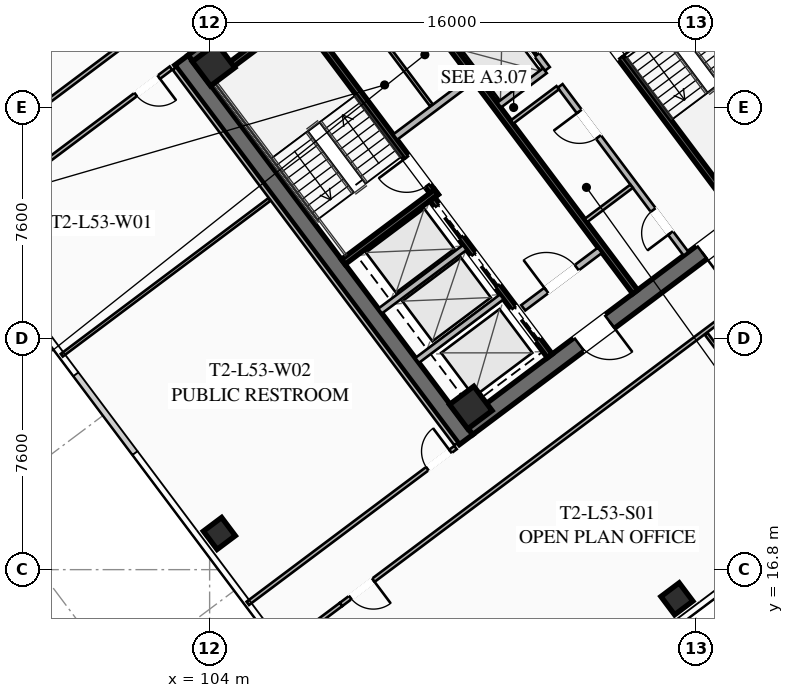
"""IFC4 building model, lengths in metres.
Left out: names, types, materials, properties, quantities, classifications, styles, units other than length and angle.
Written with IfcOpenShell. Run it as: python <this file> out.ifc"""

import sys

from ifc_helpers import new_model, si_unit, direction, frame, frame_2d, origin, origin_2d, place, context, subcontext, project, spatial, rectangle, hollow_rectangle, extrude, element, fill, save


model = new_model("IFC4")
c1 = context("Model", 3, precision=1e-05, world=origin(), true_north=direction((0.0, 1.0)))
c2 = subcontext(c1, "Body", "Model", "MODEL_VIEW")
j1 = project(units=[si_unit("LENGTHUNIT", "METRE"), si_unit("PLANEANGLEUNIT", "RADIAN")], contexts=[c1])
p1 = place(None, origin())
s1 = spatial("IfcSite", under=j1, at=p1, CompositionType="ELEMENT")
p2 = place(p1, origin())
s2 = spatial("IfcBuilding", under=s1, at=p2, CompositionType="ELEMENT")
p3 = place(p2, frame((0.0, 0.0, 196.05)))
s3 = spatial("IfcBuildingStorey", under=s2, at=p3, CompositionType="ELEMENT", Elevation=196.05)
for number, where, z_axis, x_axis in (
    (1, (112.436, 21.077, 0.0), (0.0, 0.0, 1.0), (-0.6, 0.8, 0.0)),
    (2, (115.564, 42.923, 0.0), (0.0, 0.0, 1.0), (0.6, -0.8, 0.0)),
):
    element("IfcWall", number, at=place(p3, frame(where, z_axis=z_axis, x_axis=x_axis)), inside=s3, PredefinedType="SHEAR", context=c2, shape_type="SweptSolid", body=[
        extrude(rectangle(XDim=15.6, YDim=0.55, at=frame_2d((7.8, 0.0))), origin(), (0.0, 0.0, 1.0), 3.55),
    ])
p4 = place(p3, frame((124.539, 30.498, 0.0), z_axis=(0.0, 0.0, 1.0), x_axis=(-0.799998054672, -0.600002593761, 0.0)))
e3 = element("IfcWall", 3, at=p4, inside=s3, PredefinedType="SHEAR", context=c2, shape_type="SweptSolid", body=[
    extrude(rectangle(XDim=15.06, YDim=0.55, at=frame_2d((7.53, 0.0))), origin(), (0.0, 0.0, 1.0), 3.55),
])
p5 = place(p4, frame((9.23, 0.0, 0.0)))
e4 = element("IfcOpeningElement", 4, at=p5, cuts=e3, PredefinedType="OPENING", context=c2, shape_type="SweptSolid", body=[
    extrude(rectangle(XDim=1.25, YDim=2.25, at=frame_2d((0.625, 1.125))), frame((0.0, 0.285, 0.0), z_axis=(0.0, -1.0, 0.0), x_axis=(1.0, 0.0, 0.0)), (0.0, 0.0, 1.0), 0.57),
])
p6 = place(p4, frame((4.18, 0.0, 0.0)))
e5 = element("IfcOpeningElement", 5, at=p6, cuts=e3, PredefinedType="OPENING", context=c2, shape_type="SweptSolid", body=[
    extrude(rectangle(XDim=1.25, YDim=2.25, at=frame_2d((0.625, 1.125))), frame((0.0, 0.285, 0.0), z_axis=(0.0, -1.0, 0.0), x_axis=(1.0, 0.0, 0.0)), (0.0, 0.0, 1.0), 0.57),
])
p7 = place(p3, frame((103.461, 33.502, 0.0), z_axis=(0.0, 0.0, 1.0), x_axis=(0.799998054672, 0.600002593761, 0.0)))
e6 = element("IfcWall", 6, at=p7, inside=s3, PredefinedType="SHEAR", context=c2, shape_type="SweptSolid", body=[
    extrude(rectangle(XDim=15.06, YDim=0.55, at=frame_2d((7.53, 0.0))), origin(), (0.0, 0.0, 1.0), 3.55),
])
p8 = place(p7, frame((4.58, 0.0, 0.0)))
e7 = element("IfcOpeningElement", 7, at=p8, cuts=e6, PredefinedType="OPENING", context=c2, shape_type="SweptSolid", body=[
    extrude(rectangle(XDim=1.25, YDim=2.25, at=frame_2d((0.625, 1.125))), frame((0.0, 0.285, 0.0), z_axis=(0.0, -1.0, 0.0), x_axis=(1.0, 0.0, 0.0)), (0.0, 0.0, 1.0), 0.57),
])
p9 = place(p7, frame((9.63, 0.0, 0.0)))
e8 = element("IfcOpeningElement", 8, at=p9, cuts=e6, PredefinedType="OPENING", context=c2, shape_type="SweptSolid", body=[
    extrude(rectangle(XDim=1.25, YDim=2.25, at=frame_2d((0.625, 1.125))), frame((0.0, 0.285, 0.0), z_axis=(0.0, -1.0, 0.0), x_axis=(1.0, 0.0, 0.0)), (0.0, 0.0, 1.0), 0.57),
])
for number, where, z_axis, x_axis in (
    (9, (112.59, 22.13, 0.0), (0.0, 0.0, 1.0), (0.8, 0.6, 0.0)),
    (10, (104.13, 33.41, 0.0), (0.0, 0.0, 1.0), (0.8, 0.6, 0.0)),
):
    element("IfcColumn", number, at=place(p3, frame(where, z_axis=z_axis, x_axis=x_axis)), inside=s3, PredefinedType="COLUMN", context=c2, shape_type="SweptSolid", body=[
        extrude(hollow_rectangle(XDim=1.0, YDim=1.0, WallThickness=0.04, at=origin_2d()), origin(), (0.0, 0.0, 1.0), 3.25),
    ])
for number, where, z_axis, x_axis in (
    (11, (119.37, 15.84, 0.0), (0.0, 0.0, 1.0), (0.8, 0.6, 0.0)),
    (12, (104.32, 17.99, 0.0), (0.0, 0.0, 1.0), (0.8, 0.6, 0.0)),
):
    element("IfcColumn", number, at=place(p3, frame(where, z_axis=z_axis, x_axis=x_axis)), inside=s3, PredefinedType="COLUMN", context=c2, shape_type="SweptSolid", body=[
        extrude(hollow_rectangle(XDim=0.75, YDim=0.75, WallThickness=0.032, at=origin_2d()), origin(), (0.0, 0.0, 1.0), 3.25),
    ])
p10 = place(p3, frame((111.44, 29.08, 0.0), z_axis=(0.0, 0.0, 1.0), x_axis=(-0.59999029481, 0.8000072788, 0.0)))
e13 = element("IfcWall", 13, at=p10, inside=s3, PredefinedType="SHEAR", context=c2, shape_type="SweptSolid", body=[
    extrude(rectangle(XDim=8.05, YDim=0.2, at=frame_2d((4.025, 0.0))), origin(), (0.0, 0.0, 1.0), 3.25),
])
p11 = place(p10, frame((0.45, 0.0, 0.0)))
e14 = element("IfcOpeningElement", 14, at=p11, cuts=e13, PredefinedType="OPENING", context=c2, shape_type="SweptSolid", body=[
    extrude(rectangle(XDim=1.15, YDim=2.2, at=frame_2d((0.575, 1.1))), frame((0.0, 0.11, 0.0), z_axis=(0.0, -1.0, 0.0), x_axis=(1.0, 0.0, 0.0)), (0.0, 0.0, 1.0), 0.22),
])
for number, where, z_axis, x_axis in (
    (15, (108.396, 26.922, 0.0), (0.0, 0.0, 1.0), (0.8, 0.6, 0.0)),
    (16, (103.956, 32.842, 0.0), (0.0, 0.0, 1.0), (0.8, 0.6, 0.0)),
):
    element("IfcWall", number, at=place(p3, frame(where, z_axis=z_axis, x_axis=x_axis)), inside=s3, PredefinedType="SHEAR", context=c2, shape_type="SweptSolid", body=[
        extrude(rectangle(XDim=3.83, YDim=0.2, at=frame_2d((1.915, 0.0))), origin(), (0.0, 0.0, 1.0), 3.25),
    ])
p12 = place(p3, frame((116.56, 34.92, 0.0), z_axis=(0.0, 0.0, 1.0), x_axis=(0.59999029481, -0.8000072788, 0.0)))
e17 = element("IfcWall", 17, at=p12, inside=s3, PredefinedType="SHEAR", context=c2, shape_type="SweptSolid", body=[
    extrude(rectangle(XDim=8.05, YDim=0.2, at=frame_2d((4.025, 0.0))), origin(), (0.0, 0.0, 1.0), 3.25),
])
p13 = place(p12, frame((0.45, 0.0, 0.0)))
e18 = element("IfcOpeningElement", 18, at=p13, cuts=e17, PredefinedType="OPENING", context=c2, shape_type="SweptSolid", body=[
    extrude(rectangle(XDim=1.15, YDim=2.2, at=frame_2d((0.575, 1.1))), frame((0.0, 0.11, 0.0), z_axis=(0.0, -1.0, 0.0), x_axis=(1.0, 0.0, 0.0)), (0.0, 0.0, 1.0), 0.22),
])
p14 = place(p3, frame((117.998, 25.936, 0.0), z_axis=(0.0, 0.0, 1.0), x_axis=(-0.600002693989, 0.799997979501, 0.0)))
e19 = element("IfcWall", 19, at=p14, inside=s3, PredefinedType="SHEAR", context=c2, shape_type="SweptSolid", body=[
    extrude(rectangle(XDim=14.5, YDim=0.2, at=frame_2d((7.25, 0.0))), origin(), (0.0, 0.0, 1.0), 3.25),
])
p15 = place(p3, frame((110.104, 31.028, 0.0), z_axis=(0.0, 0.0, 1.0), x_axis=(0.800018601094, 0.59997519774, 0.0)))
e20 = element("IfcWall", 20, at=p15, inside=s3, PredefinedType="SOLIDWALL", context=c2, shape_type="SweptSolid", body=[
    extrude(rectangle(XDim=3.15, YDim=0.22, at=frame_2d((1.575, 0.0))), origin(), (0.0, 0.0, 1.0), 2.393),
])
p16 = place(p3, frame((114.316, 25.412, 0.0), z_axis=(0.0, 0.0, 1.0), x_axis=(0.800018601094, 0.59997519774, 0.0)))
e21 = element("IfcWall", 21, at=p16, inside=s3, PredefinedType="SOLIDWALL", context=c2, shape_type="SweptSolid", body=[
    extrude(rectangle(XDim=3.15, YDim=0.22, at=frame_2d((1.575, 0.0))), origin(), (0.0, 0.0, 1.0), 2.393),
])
p17 = place(p16, frame((0.95, 0.0, 0.0)))
e22 = element("IfcOpeningElement", 22, at=p17, cuts=e21, PredefinedType="OPENING", context=c2, shape_type="SweptSolid", body=[
    extrude(rectangle(XDim=1.25, YDim=2.25, at=frame_2d((0.625, 1.125))), frame((0.0, 0.12, 0.0), z_axis=(0.0, -1.0, 0.0), x_axis=(1.0, 0.0, 0.0)), (0.0, 0.0, 1.0), 0.24),
])
p18 = place(p3, frame((115.19, 23.83, 0.0), z_axis=(0.0, 0.0, 1.0), x_axis=(-0.599993943644, 0.800004542231, 0.0)))
e23 = element("IfcWall", 23, at=p18, inside=s3, PredefinedType="SHEAR", context=c2, shape_type="SweptSolid", body=[
    extrude(rectangle(XDim=6.45, YDim=0.2, at=frame_2d((3.225, 0.0))), origin(), (0.0, 0.0, 1.0), 3.25),
])
p19 = place(p18, frame((4.875, 0.0, 0.0)))
e24 = element("IfcOpeningElement", 24, at=p19, cuts=e23, PredefinedType="OPENING", context=c2, shape_type="SweptSolid", body=[
    extrude(rectangle(XDim=1.3, YDim=2.25, at=frame_2d((0.65, 1.125))), frame((0.0, 0.11, 0.0), z_axis=(0.0, -1.0, 0.0), x_axis=(1.0, 0.0, 0.0)), (0.0, 0.0, 1.0), 0.22),
])
p20 = place(p18, frame((2.875, 0.0, 0.0)))
e25 = element("IfcOpeningElement", 25, at=p20, cuts=e23, PredefinedType="OPENING", context=c2, shape_type="SweptSolid", body=[
    extrude(rectangle(XDim=1.3, YDim=2.25, at=frame_2d((0.65, 1.125))), frame((0.0, 0.11, 0.0), z_axis=(0.0, -1.0, 0.0), x_axis=(1.0, 0.0, 0.0)), (0.0, 0.0, 1.0), 0.22),
])
p21 = place(p18, frame((0.675, 0.0, 0.0)))
e26 = element("IfcOpeningElement", 26, at=p21, cuts=e23, PredefinedType="OPENING", context=c2, shape_type="SweptSolid", body=[
    extrude(rectangle(XDim=1.3, YDim=2.25, at=frame_2d((0.65, 1.125))), frame((0.0, 0.11, 0.0), z_axis=(0.0, -1.0, 0.0), x_axis=(1.0, 0.0, 0.0)), (0.0, 0.0, 1.0), 0.22),
])
for number, where, z_axis, x_axis in (
    (27, (110.826, 23.682, 0.0), (0.0, 0.0, 1.0), (0.8, 0.6, 0.0)),
    (28, (109.608, 25.306, 0.0), (0.0, 0.0, 1.0), (0.8, 0.6, 0.0)),
):
    element("IfcWall", number, at=place(p3, frame(where, z_axis=z_axis, x_axis=x_axis)), inside=s3, PredefinedType="SOLIDWALL", context=c2, shape_type="SweptSolid", body=[
        extrude(rectangle(XDim=3.48, YDim=0.2, at=frame_2d((1.74, 0.0))), origin(), (0.0, 0.0, 1.0), 3.25),
    ])
p22 = place(p3, frame((111.296, 32.072, 0.0), z_axis=(0.0, 0.0, 1.0), x_axis=(-0.59995887973, 0.800030838552, 0.0)))
e29 = element("IfcWall", 29, at=p22, inside=s3, PredefinedType="PARTITIONING", context=c2, shape_type="SweptSolid", body=[
    extrude(rectangle(XDim=3.8, YDim=0.11, at=frame_2d((1.9, 0.0))), origin(), (0.0, 0.0, 1.0), 2.393),
])
p23 = place(p3, frame((119.67, 27.19, 0.0), z_axis=(0.0, 0.0, 1.0), x_axis=(-0.599988677396, 0.800008491828, 0.0)))
e30 = element("IfcWall", 30, at=p23, inside=s3, PredefinedType="SOLIDWALL", context=c2, shape_type="SweptSolid", body=[
    extrude(rectangle(XDim=6.9, YDim=0.2, at=frame_2d((3.45, 0.0))), origin(), (0.0, 0.0, 1.0), 2.393),
])
p24 = place(p23, frame((0.85, 0.0, 0.0)))
e31 = element("IfcOpeningElement", 31, at=p24, cuts=e30, PredefinedType="OPENING", context=c2, shape_type="SweptSolid", body=[
    extrude(rectangle(XDim=0.95, YDim=2.05, at=frame_2d((0.475, 1.025))), frame((0.0, 0.11, 0.0), z_axis=(0.0, -1.0, 0.0), x_axis=(1.0, 0.0, 0.0)), (0.0, 0.0, 1.0), 0.22),
])
p25 = place(p23, frame((4.8, 0.0, 0.0)))
e32 = element("IfcOpeningElement", 32, at=p25, cuts=e30, PredefinedType="OPENING", context=c2, shape_type="SweptSolid", body=[
    extrude(rectangle(XDim=1.05, YDim=2.2, at=frame_2d((0.525, 1.1))), frame((0.0, 0.11, 0.0), z_axis=(0.0, -1.0, 0.0), x_axis=(1.0, 0.0, 0.0)), (0.0, 0.0, 1.0), 0.22),
])
for number, where, z_axis, x_axis in (
    (33, (113.946, 31.522, 0.0), (0.0, 0.0, 1.0), (0.8, 0.6, 0.0)),
    (34, (116.376, 28.282, 0.0), (0.0, 0.0, 1.0), (0.8, 0.6, 0.0)),
):
    element("IfcWall", number, at=place(p3, frame(where, z_axis=z_axis, x_axis=x_axis)), inside=s3, PredefinedType="PARTITIONING", context=c2, shape_type="SweptSolid", body=[
        extrude(rectangle(XDim=1.88, YDim=0.135, at=frame_2d((0.94, 0.0))), origin(), (0.0, 0.0, 1.0), 2.393),
    ])
p26 = place(p3, frame((115.11, 33.27, 0.0), z_axis=(0.0, 0.0, 1.0), x_axis=(-0.600011322243, 0.799991508192, 0.0)))
e35 = element("IfcWall", 35, at=p26, inside=s3, PredefinedType="SOLIDWALL", context=c2, shape_type="SweptSolid", body=[
    extrude(rectangle(XDim=6.9, YDim=0.2, at=frame_2d((3.45, 0.0))), origin(), (0.0, 0.0, 1.0), 3.25),
])
p27 = place(p26, frame((0.575, 0.0, 0.0)))
e36 = element("IfcOpeningElement", 36, at=p27, cuts=e35, PredefinedType="OPENING", context=c2, shape_type="SweptSolid", body=[
    extrude(rectangle(XDim=1.1, YDim=2.2, at=frame_2d((0.55, 1.1))), frame((0.0, 0.11, 0.0), z_axis=(0.0, -1.0, 0.0), x_axis=(1.0, 0.0, 0.0)), (0.0, 0.0, 1.0), 0.22),
])
p28 = place(p26, frame((2.825, 0.0, 0.0)))
e37 = element("IfcOpeningElement", 37, at=p28, cuts=e35, PredefinedType="OPENING", context=c2, shape_type="SweptSolid", body=[
    extrude(rectangle(XDim=1.1, YDim=2.2, at=frame_2d((0.55, 1.1))), frame((0.0, 0.11, 0.0), z_axis=(0.0, -1.0, 0.0), x_axis=(1.0, 0.0, 0.0)), (0.0, 0.0, 1.0), 0.22),
])
p29 = place(p26, frame((5.075, 0.0, 0.0)))
e38 = element("IfcOpeningElement", 38, at=p29, cuts=e35, PredefinedType="OPENING", context=c2, shape_type="SweptSolid", body=[
    extrude(rectangle(XDim=1.1, YDim=2.2, at=frame_2d((0.55, 1.1))), frame((0.0, 0.11, 0.0), z_axis=(0.0, -1.0, 0.0), x_axis=(1.0, 0.0, 0.0)), (0.0, 0.0, 1.0), 0.22),
])
p30 = place(p3, frame((113.526, 32.082, 0.0), z_axis=(0.0, 0.0, 1.0), x_axis=(0.800046745961, 0.599937666993, 0.0)))
e39 = element("IfcWall", 39, at=p30, inside=s3, PredefinedType="SOLIDWALL", context=c2, shape_type="SweptSolid", body=[
    extrude(rectangle(XDim=1.88, YDim=0.2, at=frame_2d((0.94, 0.0))), origin(), (0.0, 0.0, 1.0), 3.25),
])
p31 = place(p3, frame((112.176, 33.882, 0.0), z_axis=(0.0, 0.0, 1.0), x_axis=(0.8, 0.6, 0.0)))
e40 = element("IfcWall", 40, at=p31, inside=s3, PredefinedType="SOLIDWALL", context=c2, shape_type="SweptSolid", body=[
    extrude(rectangle(XDim=1.88, YDim=0.2, at=frame_2d((0.94, 0.0))), origin(), (0.0, 0.0, 1.0), 3.25),
])
p32 = place(p3, frame((96.91, 30.87, 0.0), z_axis=(0.0, 0.0, 1.0), x_axis=(0.800003062365, 0.599995916825, 0.0)))
e41 = element("IfcWall", 41, at=p32, inside=s3, PredefinedType="PARTITIONING", context=c2, shape_type="SweptSolid", body=[
    extrude(rectangle(XDim=28.7, YDim=0.135, at=frame_2d((14.35, 0.0))), origin(), (0.0, 0.0, 1.0), 2.393),
])
p33 = place(p32, frame((0.3, 0.0, 0.0)))
e42 = element("IfcOpeningElement", 42, at=p33, cuts=e41, PredefinedType="OPENING", context=c2, shape_type="SweptSolid", body=[
    extrude(rectangle(XDim=0.95, YDim=2.05, at=frame_2d((0.475, 1.025))), frame((0.0, 0.077, 0.0), z_axis=(0.0, -1.0, 0.0), x_axis=(1.0, 0.0, 0.0)), (0.0, 0.0, 1.0), 0.155),
])
p34 = place(p32, frame((27.45, 0.0, 0.0)))
e43 = element("IfcOpeningElement", 43, at=p34, cuts=e41, PredefinedType="OPENING", context=c2, shape_type="SweptSolid", body=[
    extrude(rectangle(XDim=0.95, YDim=2.05, at=frame_2d((0.475, 1.025))), frame((0.0, 0.077, 0.0), z_axis=(0.0, -1.0, 0.0), x_axis=(1.0, 0.0, 0.0)), (0.0, 0.0, 1.0), 0.155),
])
p35 = place(p3, frame((131.282, 32.874, 0.0), z_axis=(0.0, 0.0, 1.0), x_axis=(-0.8, -0.6, 0.0)))
e44 = element("IfcWall", 44, at=p35, inside=s3, PredefinedType="PARTITIONING", context=c2, shape_type="SweptSolid", body=[
    extrude(rectangle(XDim=28.7, YDim=0.135, at=frame_2d((14.35, 0.0))), origin(), (0.0, 0.0, 1.0), 2.393),
])
p36 = place(p35, frame((27.37, 0.0, 0.0)))
e45 = element("IfcOpeningElement", 45, at=p36, cuts=e44, PredefinedType="OPENING", context=c2, shape_type="SweptSolid", body=[
    extrude(rectangle(XDim=0.95, YDim=2.05, at=frame_2d((0.475, 1.025))), frame((0.0, 0.077, 0.0), z_axis=(0.0, -1.0, 0.0), x_axis=(1.0, 0.0, 0.0)), (0.0, 0.0, 1.0), 0.155),
])
p37 = place(p35, frame((0.38, 0.0, 0.0)))
e46 = element("IfcOpeningElement", 46, at=p37, cuts=e44, PredefinedType="OPENING", context=c2, shape_type="SweptSolid", body=[
    extrude(rectangle(XDim=0.95, YDim=2.05, at=frame_2d((0.475, 1.025))), frame((0.0, 0.077, 0.0), z_axis=(0.0, -1.0, 0.0), x_axis=(1.0, 0.0, 0.0)), (0.0, 0.0, 1.0), 0.155),
])
p38 = place(p3, frame((106.378, 14.196, 0.0), z_axis=(0.0, 0.0, 1.0), x_axis=(0.800012055778, 0.599983925293, 0.0)))
e47 = element("IfcWall", 47, at=p38, inside=s3, PredefinedType="PARTITIONING", context=c2, shape_type="SweptSolid", body=[
    extrude(rectangle(XDim=2.43, YDim=0.135, at=frame_2d((1.215, 0.0))), origin(), (0.0, 0.0, 1.0), 2.393),
])
p39 = place(p3, frame((124.548, 18.936, 0.0), z_axis=(0.0, 0.0, 1.0), x_axis=(-0.6, 0.8, 0.0)))
e48 = element("IfcWall", 48, at=p39, inside=s3, PredefinedType="PARTITIONING", context=c2, shape_type="SweptSolid", body=[
    extrude(rectangle(XDim=7.03, YDim=0.11, at=frame_2d((3.515, 0.0))), origin(), (0.0, 0.0, 1.0), 2.393),
])
p40 = place(p3, frame((112.104, 20.928, 0.0), z_axis=(0.0, 0.0, 1.0), x_axis=(-0.599994940075, 0.800003794918, 0.0)))
e49 = element("IfcWall", 49, at=p40, inside=s3, PredefinedType="PARTITIONING", context=c2, shape_type="SweptSolid", body=[
    extrude(rectangle(XDim=15.44, YDim=0.135, at=frame_2d((7.72, 0.0))), origin(), (0.0, 0.0, 1.0), 2.393),
])
p41 = place(p3, frame((102.728, 33.296, 0.0), z_axis=(0.0, 0.0, 1.0), x_axis=(-0.800013722153, -0.59998170336, 0.0)))
e50 = element("IfcWall", 50, at=p41, inside=s3, PredefinedType="PARTITIONING", context=c2, shape_type="SweptSolid", body=[
    extrude(rectangle(XDim=8.54, YDim=0.135, at=frame_2d((4.27, 0.0))), origin(), (0.0, 0.0, 1.0), 2.393),
])
p42 = place(p41, frame((0.5, 0.0, 0.0)))
e51 = element("IfcOpeningElement", 51, at=p42, cuts=e50, PredefinedType="OPENING", context=c2, shape_type="SweptSolid", body=[
    extrude(rectangle(XDim=0.95, YDim=2.05, at=frame_2d((0.475, 1.025))), frame((0.0, 0.077, 0.0), z_axis=(0.0, -1.0, 0.0), x_axis=(1.0, 0.0, 0.0)), (0.0, 0.0, 1.0), 0.155),
])
p43 = place(p3, frame((105.256, 15.692, 0.0), z_axis=(0.0, 0.0, 1.0), x_axis=(0.799989708052, 0.600013722352, 0.0)))
e52 = element("IfcWall", 52, at=p43, inside=s3, PredefinedType="PARTITIONING", context=c2, shape_type="SweptSolid", body=[
    extrude(rectangle(XDim=8.54, YDim=0.135, at=frame_2d((4.27, 0.0))), origin(), (0.0, 0.0, 1.0), 2.393),
])
p44 = place(p43, frame((7.38, 0.0, 0.0)))
e53 = element("IfcOpeningElement", 53, at=p44, cuts=e52, PredefinedType="OPENING", context=c2, shape_type="SweptSolid", body=[
    extrude(rectangle(XDim=0.95, YDim=2.05, at=frame_2d((0.475, 1.025))), frame((0.0, 0.077, 0.0), z_axis=(0.0, -1.0, 0.0), x_axis=(1.0, 0.0, 0.0)), (0.0, 0.0, 1.0), 0.155),
])
p45 = place(p3, frame((99.136, 23.852, 0.0), z_axis=(0.0, 0.0, 1.0), x_axis=(0.8, 0.6, 0.0)))
e54 = element("IfcWall", 54, at=p45, inside=s3, PredefinedType="PARTITIONING", context=c2, shape_type="SweptSolid", body=[
    extrude(rectangle(XDim=8.54, YDim=0.11, at=frame_2d((4.27, 0.0))), origin(), (0.0, 0.0, 1.0), 2.393),
])
p46 = place(p5, origin())
e55 = element("IfcDoor", 55, at=p46, inside=s3, OperationType="SINGLE_SWING_LEFT", PredefinedType="DOOR", context=c2, shape_type="SweptSolid", body=[
    extrude(rectangle(XDim=1.25, YDim=2.25, at=frame_2d((0.625, 1.125))), frame((0.0, 0.025, 0.0), z_axis=(0.0, -1.0, 0.0), x_axis=(1.0, 0.0, 0.0)), (0.0, 0.0, 1.0), 0.05),
])
fill(e4, e55)
p47 = place(p6, origin())
e56 = element("IfcDoor", 56, at=p47, inside=s3, OperationType="SINGLE_SWING_RIGHT", PredefinedType="DOOR", context=c2, shape_type="SweptSolid", body=[
    extrude(rectangle(XDim=1.25, YDim=2.25, at=frame_2d((0.625, 1.125))), frame((0.0, 0.025, 0.0), z_axis=(0.0, -1.0, 0.0), x_axis=(1.0, 0.0, 0.0)), (0.0, 0.0, 1.0), 0.05),
])
fill(e5, e56)
p48 = place(p11, origin())
e57 = element("IfcDoor", 57, at=p48, inside=s3, OperationType="SINGLE_SWING_RIGHT", PredefinedType="DOOR", context=c2, shape_type="SweptSolid", body=[
    extrude(rectangle(XDim=1.15, YDim=2.2, at=frame_2d((0.575, 1.1))), frame((0.0, 0.025, 0.0), z_axis=(0.0, -1.0, 0.0), x_axis=(1.0, 0.0, 0.0)), (0.0, 0.0, 1.0), 0.05),
])
fill(e14, e57)
p49 = place(p13, origin())
e58 = element("IfcDoor", 58, at=p49, inside=s3, OperationType="SINGLE_SWING_RIGHT", PredefinedType="DOOR", context=c2, shape_type="SweptSolid", body=[
    extrude(rectangle(XDim=1.15, YDim=2.2, at=frame_2d((0.575, 1.1))), frame((0.0, 0.025, 0.0), z_axis=(0.0, -1.0, 0.0), x_axis=(1.0, 0.0, 0.0)), (0.0, 0.0, 1.0), 0.05),
])
fill(e18, e58)
p50 = place(p17, origin())
e59 = element("IfcDoor", 59, at=p50, inside=s3, OperationType="SINGLE_SWING_LEFT", PredefinedType="DOOR", context=c2, shape_type="SweptSolid", body=[
    extrude(rectangle(XDim=1.25, YDim=2.25, at=frame_2d((0.625, 1.125))), frame((0.0, 0.025, 0.0), z_axis=(0.0, -1.0, 0.0), x_axis=(1.0, 0.0, 0.0)), (0.0, 0.0, 1.0), 0.05),
])
fill(e22, e59)
p51 = place(p24, origin())
e60 = element("IfcDoor", 60, at=p51, inside=s3, OperationType="SINGLE_SWING_LEFT", PredefinedType="DOOR", context=c2, shape_type="SweptSolid", body=[
    extrude(rectangle(XDim=0.95, YDim=2.05, at=frame_2d((0.475, 1.025))), frame((0.0, 0.025, 0.0), z_axis=(0.0, -1.0, 0.0), x_axis=(1.0, 0.0, 0.0)), (0.0, 0.0, 1.0), 0.05),
])
fill(e31, e60)
p52 = place(p25, origin())
e61 = element("IfcDoor", 61, at=p52, inside=s3, OperationType="SINGLE_SWING_RIGHT", PredefinedType="DOOR", context=c2, shape_type="SweptSolid", body=[
    extrude(rectangle(XDim=1.05, YDim=2.2, at=frame_2d((0.525, 1.1))), frame((0.0, 0.025, 0.0), z_axis=(0.0, -1.0, 0.0), x_axis=(1.0, 0.0, 0.0)), (0.0, 0.0, 1.0), 0.05),
])
fill(e32, e61)
p53 = place(p36, origin())
e62 = element("IfcDoor", 62, at=p53, inside=s3, OperationType="SINGLE_SWING_LEFT", PredefinedType="DOOR", context=c2, shape_type="SweptSolid", body=[
    extrude(rectangle(XDim=0.95, YDim=2.05, at=frame_2d((0.475, 1.025))), frame((0.0, 0.025, 0.0), z_axis=(0.0, -1.0, 0.0), x_axis=(1.0, 0.0, 0.0)), (0.0, 0.0, 1.0), 0.05),
])
fill(e45, e62)
p54 = place(p42, origin())
e63 = element("IfcDoor", 63, at=p54, inside=s3, OperationType="SINGLE_SWING_LEFT", PredefinedType="DOOR", context=c2, shape_type="SweptSolid", body=[
    extrude(rectangle(XDim=0.95, YDim=2.05, at=frame_2d((0.475, 1.025))), frame((0.0, 0.025, 0.0), z_axis=(0.0, -1.0, 0.0), x_axis=(1.0, 0.0, 0.0)), (0.0, 0.0, 1.0), 0.05),
])
fill(e51, e63)
p55 = place(p44, origin())
e64 = element("IfcDoor", 64, at=p55, inside=s3, OperationType="SINGLE_SWING_RIGHT", PredefinedType="DOOR", context=c2, shape_type="SweptSolid", body=[
    extrude(rectangle(XDim=0.95, YDim=2.05, at=frame_2d((0.475, 1.025))), frame((0.0, 0.025, 0.0), z_axis=(0.0, -1.0, 0.0), x_axis=(1.0, 0.0, 0.0)), (0.0, 0.0, 1.0), 0.05),
])
fill(e53, e64)
p56 = place(p19, origin())
e65 = element("IfcDoor", 65, at=p56, inside=s3, OperationType="SLIDING_TO_LEFT", PredefinedType="DOOR", context=c2, shape_type="SweptSolid", body=[
    extrude(rectangle(XDim=1.3, YDim=2.25, at=frame_2d((0.65, 1.125))), frame((0.0, 0.025, 0.0), z_axis=(0.0, -1.0, 0.0), x_axis=(1.0, 0.0, 0.0)), (0.0, 0.0, 1.0), 0.05),
])
fill(e24, e65)
p57 = place(p20, origin())
e66 = element("IfcDoor", 66, at=p57, inside=s3, OperationType="SLIDING_TO_LEFT", PredefinedType="DOOR", context=c2, shape_type="SweptSolid", body=[
    extrude(rectangle(XDim=1.3, YDim=2.25, at=frame_2d((0.65, 1.125))), frame((0.0, 0.025, 0.0), z_axis=(0.0, -1.0, 0.0), x_axis=(1.0, 0.0, 0.0)), (0.0, 0.0, 1.0), 0.05),
])
fill(e25, e66)
p58 = place(p21, origin())
e67 = element("IfcDoor", 67, at=p58, inside=s3, OperationType="SLIDING_TO_LEFT", PredefinedType="DOOR", context=c2, shape_type="SweptSolid", body=[
    extrude(rectangle(XDim=1.3, YDim=2.25, at=frame_2d((0.65, 1.125))), frame((0.0, 0.025, 0.0), z_axis=(0.0, -1.0, 0.0), x_axis=(1.0, 0.0, 0.0)), (0.0, 0.0, 1.0), 0.05),
])
fill(e26, e67)
p59 = place(p27, origin())
e68 = element("IfcDoor", 68, at=p59, inside=s3, OperationType="SLIDING_TO_LEFT", PredefinedType="DOOR", context=c2, shape_type="SweptSolid", body=[
    extrude(rectangle(XDim=1.1, YDim=2.2, at=frame_2d((0.55, 1.1))), frame((0.0, 0.025, 0.0), z_axis=(0.0, -1.0, 0.0), x_axis=(1.0, 0.0, 0.0)), (0.0, 0.0, 1.0), 0.05),
])
fill(e36, e68)
save(model, sys.argv[1])
